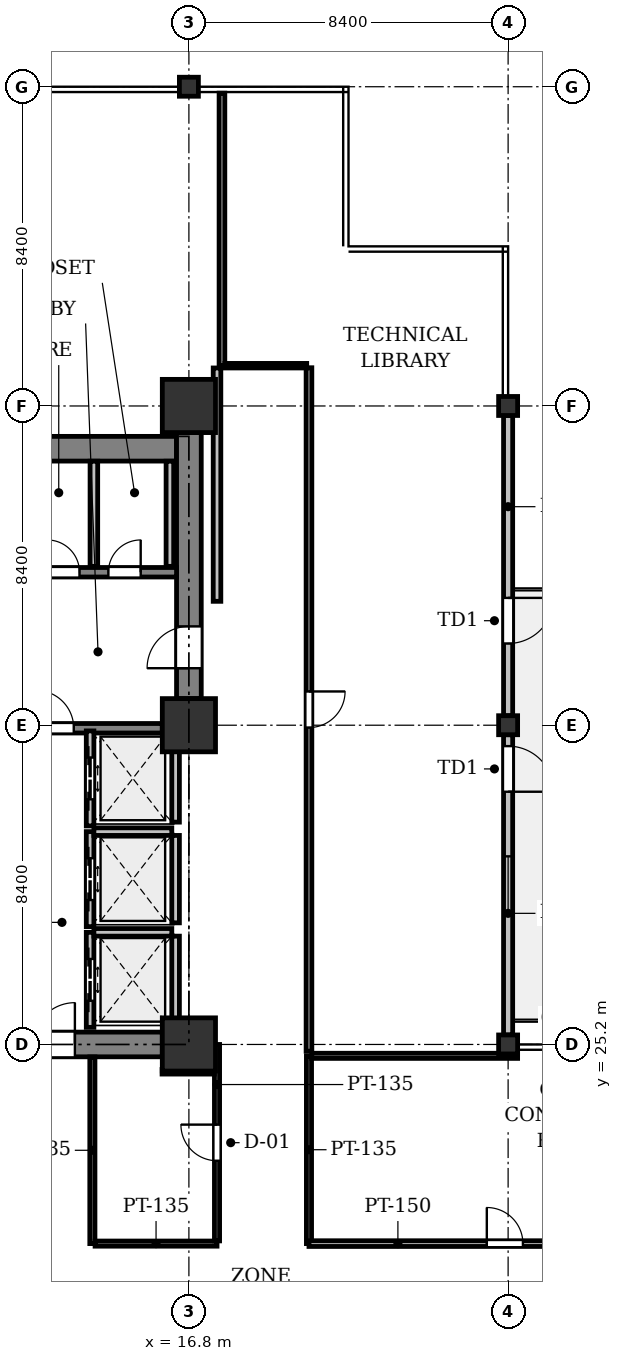
"""IFC4 building model, lengths in metres.
Left out: names, types, materials, properties, quantities, classifications, styles, units other than length and angle.
Written with IfcOpenShell. Run it as: python <this file> out.ifc"""

import sys

from ifc_helpers import new_model, si_unit, direction, frame, frame_2d, origin, origin_2d, place, context, subcontext, project, spatial, rectangle, i_section, extrude, element, fill, save


model = new_model("IFC4")
c1 = context("Model", 3, precision=1e-05, world=origin(), true_north=direction((0.0, 1.0)))
c2 = subcontext(c1, "Body", "Model", "MODEL_VIEW")
j1 = project(units=[si_unit("LENGTHUNIT", "METRE"), si_unit("PLANEANGLEUNIT", "RADIAN")], contexts=[c1])
p1 = place(None, origin())
s1 = spatial("IfcSite", under=j1, at=p1, CompositionType="ELEMENT")
p2 = place(p1, origin())
s2 = spatial("IfcBuilding", under=s1, at=p2, CompositionType="ELEMENT")
p3 = place(p2, frame((0.0, 0.0, 37.4)))
s3 = spatial("IfcBuildingStorey", under=s2, at=p3, CompositionType="ELEMENT", Elevation=37.4)
for number, where, z_axis, x_axis in (
    (1, (16.8, 25.2, 0.0), (0.0, 0.0, 1.0), (1.0, 0.0, 0.0)),
    (2, (16.8, 33.6, 0.0), (0.0, 0.0, 1.0), (1.0, 0.0, 0.0)),
    (3, (16.8, 42.0, 0.0), (0.0, 0.0, 1.0), (1.0, 0.0, 0.0)),
):
    element("IfcColumn", number, at=place(p3, frame(where, z_axis=z_axis, x_axis=x_axis)), inside=s3, PredefinedType="COLUMN", context=c2, shape_type="SweptSolid", body=[
        extrude(rectangle(XDim=1.4, YDim=1.4, at=origin_2d()), origin(), (0.0, 0.0, 1.0), 4.2),
    ])
for number, where, z_axis, x_axis in (
    (4, (16.8, 50.4, 0.0), (0.0, 0.0, 1.0), (1.0, 0.0, 0.0)),
    (5, (25.2, 25.2, 0.0), (0.0, 0.0, 1.0), (1.0, 0.0, 0.0)),
    (6, (25.2, 33.6, 0.0), (0.0, 0.0, 1.0), (1.0, 0.0, 0.0)),
    (7, (25.2, 42.0, 0.0), (0.0, 0.0, 1.0), (1.0, 0.0, 0.0)),
):
    element("IfcColumn", number, at=place(p3, frame(where, z_axis=z_axis, x_axis=x_axis)), inside=s3, PredefinedType="COLUMN", context=c2, shape_type="SweptSolid", body=[
        extrude(i_section(OverallWidth=0.5, OverallDepth=0.5, WebThickness=0.028, FlangeThickness=0.04, at=origin_2d()), origin(), (0.0, 0.0, 1.0), 4.2),
    ])
p4 = place(p3, frame((25.2, 41.75, 0.0), z_axis=(0.0, 0.0, 1.0), x_axis=(0.0, -1.0, 0.0)))
e8 = element("IfcWall", 8, at=p4, inside=s3, PredefinedType="STANDARD", context=c2, shape_type="SweptSolid", body=[
    extrude(rectangle(XDim=7.9, YDim=0.24, at=frame_2d((3.95, 0.0))), origin(), (0.0, 0.0, 1.0), 3.471),
])
p5 = place(p4, frame((4.8, 0.0, 0.0)))
e9 = element("IfcOpeningElement", 9, at=p5, cuts=e8, PredefinedType="OPENING", context=c2, shape_type="SweptSolid", body=[
    extrude(rectangle(XDim=1.2, YDim=2.2, at=frame_2d((0.6, 1.1))), frame((0.0, 0.13, 0.0), z_axis=(0.0, -1.0, 0.0), x_axis=(1.0, 0.0, 0.0)), (0.0, 0.0, 1.0), 0.26),
])
p6 = place(p3, frame((25.2, 33.35, 0.0), z_axis=(0.0, 0.0, 1.0), x_axis=(0.0, -1.0, 0.0)))
e10 = element("IfcWall", 10, at=p6, inside=s3, PredefinedType="STANDARD", context=c2, shape_type="SweptSolid", body=[
    extrude(rectangle(XDim=7.9, YDim=0.24, at=frame_2d((3.95, 0.0))), origin(), (0.0, 0.0, 1.0), 3.471),
])
p7 = place(p6, frame((0.3, 0.0, 0.0)))
e11 = element("IfcOpeningElement", 11, at=p7, cuts=e10, PredefinedType="OPENING", context=c2, shape_type="SweptSolid", body=[
    extrude(rectangle(XDim=1.2, YDim=2.2, at=frame_2d((0.6, 1.1))), frame((0.0, 0.13, 0.0), z_axis=(0.0, -1.0, 0.0), x_axis=(1.0, 0.0, 0.0)), (0.0, 0.0, 1.0), 0.26),
])
p8 = place(p6, frame((3.2, 0.0, 0.9)))
e12 = element("IfcOpeningElement", 12, at=p8, cuts=e10, PredefinedType="OPENING", context=c2, shape_type="SweptSolid", body=[
    extrude(rectangle(XDim=1.5, YDim=1.6, at=frame_2d((0.75, 0.8))), frame((0.0, 0.13, 0.0), z_axis=(0.0, -1.0, 0.0), x_axis=(1.0, 0.0, 0.0)), (0.0, 0.0, 1.0), 0.26),
])
p9 = place(p3, frame((8.725, 40.875, 0.0), z_axis=(0.0, 0.0, 1.0), x_axis=(1.0, 0.0, 0.0)))
e13 = element("IfcWall", 13, at=p9, inside=s3, PredefinedType="SHEAR", context=c2, shape_type="SweptSolid", body=[
    extrude(rectangle(XDim=7.75, YDim=0.65, at=frame_2d((3.875, 0.0))), origin(), (0.0, 0.0, 1.0), 3.925),
])
p10 = place(p3, frame((16.8, 34.3, 0.0), z_axis=(0.0, 0.0, 1.0), x_axis=(0.0, 1.0, 0.0)))
e14 = element("IfcWall", 14, at=p10, inside=s3, PredefinedType="SHEAR", context=c2, shape_type="SweptSolid", body=[
    extrude(rectangle(XDim=7.0, YDim=0.65, at=frame_2d((3.5, 0.0))), origin(), (0.0, 0.0, 1.0), 3.925),
])
p11 = place(p10, frame((0.8, 0.0, 0.0)))
e15 = element("IfcOpeningElement", 15, at=p11, cuts=e14, PredefinedType="OPENING", context=c2, shape_type="SweptSolid", body=[
    extrude(rectangle(XDim=1.1, YDim=2.15, at=frame_2d((0.55, 1.075))), frame((0.0, 0.335, 0.0), z_axis=(0.0, -1.0, 0.0), x_axis=(1.0, 0.0, 0.0)), (0.0, 0.0, 1.0), 0.67),
])
p12 = place(p3, frame((9.1, 25.2, 0.0), z_axis=(0.0, 0.0, 1.0), x_axis=(1.0, 0.0, 0.0)))
e16 = element("IfcWall", 16, at=p12, inside=s3, PredefinedType="SHEAR", context=c2, shape_type="SweptSolid", body=[
    extrude(rectangle(XDim=7.0, YDim=0.65, at=frame_2d((3.5, 0.0))), origin(), (0.0, 0.0, 1.0), 3.925),
])
p13 = place(p12, frame((3.6, 0.0, 0.0)))
e17 = element("IfcOpeningElement", 17, at=p13, cuts=e16, PredefinedType="OPENING", context=c2, shape_type="SweptSolid", body=[
    extrude(rectangle(XDim=1.1, YDim=2.15, at=frame_2d((0.55, 1.075))), frame((0.0, 0.335, 0.0), z_axis=(0.0, -1.0, 0.0), x_axis=(1.0, 0.0, 0.0)), (0.0, 0.0, 1.0), 0.67),
])
p14 = place(p3, frame((12.45, 33.52, 0.0), z_axis=(0.0, 0.0, 1.0), x_axis=(1.0, 0.0, 0.0)))
e18 = element("IfcWall", 18, at=p14, inside=s3, PredefinedType="SHEAR", context=c2, shape_type="SweptSolid", body=[
    extrude(rectangle(XDim=3.65, YDim=0.25, at=frame_2d((1.825, 0.0))), origin(), (0.0, 0.0, 1.0), 3.925),
])
p15 = place(p14, frame((0.32, 0.0, 0.0)))
e19 = element("IfcOpeningElement", 19, at=p15, cuts=e18, PredefinedType="OPENING", context=c2, shape_type="SweptSolid", body=[
    extrude(rectangle(XDim=1.0, YDim=2.15, at=frame_2d((0.5, 1.075))), frame((0.0, 0.135, 0.0), z_axis=(0.0, -1.0, 0.0), x_axis=(1.0, 0.0, 0.0)), (0.0, 0.0, 1.0), 0.27),
])
p16 = place(p3, frame((12.45, 37.625, 0.0), z_axis=(0.0, 0.0, 1.0), x_axis=(1.0, 0.0, 0.0)))
e20 = element("IfcWall", 20, at=p16, inside=s3, PredefinedType="SHEAR", context=c2, shape_type="SweptSolid", body=[
    extrude(rectangle(XDim=4.025, YDim=0.25, at=frame_2d((2.013, 0.0))), origin(), (0.0, 0.0, 1.0), 3.925),
])
p17 = place(p16, frame((0.622, 0.0, 0.0)))
e21 = element("IfcOpeningElement", 21, at=p17, cuts=e20, PredefinedType="OPENING", context=c2, shape_type="SweptSolid", body=[
    extrude(rectangle(XDim=0.85, YDim=2.15, at=frame_2d((0.425, 1.075))), frame((0.0, 0.135, 0.0), z_axis=(0.0, -1.0, 0.0), x_axis=(1.0, 0.0, 0.0)), (0.0, 0.0, 1.0), 0.27),
])
p18 = place(p16, frame((2.231, 0.0, 0.0)))
e22 = element("IfcOpeningElement", 22, at=p18, cuts=e20, PredefinedType="OPENING", context=c2, shape_type="SweptSolid", body=[
    extrude(rectangle(XDim=0.85, YDim=2.15, at=frame_2d((0.425, 1.075))), frame((0.0, 0.135, 0.0), z_axis=(0.0, -1.0, 0.0), x_axis=(1.0, 0.0, 0.0)), (0.0, 0.0, 1.0), 0.27),
])
p19 = place(p3, frame((14.2, 25.65, 0.0), z_axis=(0.0, 0.0, 1.0), x_axis=(0.0, 1.0, 0.0)))
e23 = element("IfcWall", 23, at=p19, inside=s3, PredefinedType="PARTITIONING", context=c2, shape_type="SweptSolid", body=[
    extrude(rectangle(XDim=2.5, YDim=0.2, at=frame_2d((1.25, 0.0))), origin(), (0.0, 0.0, 1.0), 3.925),
])
p20 = place(p19, frame((0.7, 0.0, 0.0)))
e24 = element("IfcOpeningElement", 24, at=p20, cuts=e23, PredefinedType="OPENING", context=c2, shape_type="SweptSolid", body=[
    extrude(rectangle(XDim=1.1, YDim=2.2, at=frame_2d((0.55, 1.1))), frame((0.0, 0.11, 0.0), z_axis=(0.0, -1.0, 0.0), x_axis=(1.0, 0.0, 0.0)), (0.0, 0.0, 1.0), 0.22),
])
p21 = place(p3, frame((16.45, 25.75, 0.0), z_axis=(0.0, 0.0, 1.0), x_axis=(0.0, 1.0, 0.0)))
e25 = element("IfcWall", 25, at=p21, inside=s3, PredefinedType="PARTITIONING", context=c2, shape_type="SweptSolid", body=[
    extrude(rectangle(XDim=2.3, YDim=0.2, at=frame_2d((1.15, 0.0))), origin(), (0.0, 0.0, 1.0), 3.925),
])
p22 = place(p3, frame((14.3, 28.15, 0.0), z_axis=(0.0, 0.0, 1.0), x_axis=(1.0, 0.0, 0.0)))
e26 = element("IfcWall", 26, at=p22, inside=s3, PredefinedType="PARTITIONING", context=c2, shape_type="SweptSolid", body=[
    extrude(rectangle(XDim=2.05, YDim=0.2, at=frame_2d((1.025, 0.0))), origin(), (0.0, 0.0, 1.0), 3.925),
])
p23 = place(p3, frame((14.2, 28.3, 0.0), z_axis=(0.0, 0.0, 1.0), x_axis=(0.0, 1.0, 0.0)))
e27 = element("IfcWall", 27, at=p23, inside=s3, PredefinedType="PARTITIONING", context=c2, shape_type="SweptSolid", body=[
    extrude(rectangle(XDim=2.5, YDim=0.2, at=frame_2d((1.25, 0.0))), origin(), (0.0, 0.0, 1.0), 3.925),
])
p24 = place(p23, frame((0.7, 0.0, 0.0)))
e28 = element("IfcOpeningElement", 28, at=p24, cuts=e27, PredefinedType="OPENING", context=c2, shape_type="SweptSolid", body=[
    extrude(rectangle(XDim=1.1, YDim=2.2, at=frame_2d((0.55, 1.1))), frame((0.0, 0.11, 0.0), z_axis=(0.0, -1.0, 0.0), x_axis=(1.0, 0.0, 0.0)), (0.0, 0.0, 1.0), 0.22),
])
p25 = place(p3, frame((16.45, 28.4, 0.0), z_axis=(0.0, 0.0, 1.0), x_axis=(0.0, 1.0, 0.0)))
e29 = element("IfcWall", 29, at=p25, inside=s3, PredefinedType="PARTITIONING", context=c2, shape_type="SweptSolid", body=[
    extrude(rectangle(XDim=2.3, YDim=0.2, at=frame_2d((1.15, 0.0))), origin(), (0.0, 0.0, 1.0), 3.925),
])
p26 = place(p3, frame((14.3, 30.8, 0.0), z_axis=(0.0, 0.0, 1.0), x_axis=(1.0, 0.0, 0.0)))
e30 = element("IfcWall", 30, at=p26, inside=s3, PredefinedType="PARTITIONING", context=c2, shape_type="SweptSolid", body=[
    extrude(rectangle(XDim=2.05, YDim=0.2, at=frame_2d((1.025, 0.0))), origin(), (0.0, 0.0, 1.0), 3.925),
])
p27 = place(p3, frame((14.2, 30.95, 0.0), z_axis=(0.0, 0.0, 1.0), x_axis=(0.0, 1.0, 0.0)))
e31 = element("IfcWall", 31, at=p27, inside=s3, PredefinedType="PARTITIONING", context=c2, shape_type="SweptSolid", body=[
    extrude(rectangle(XDim=2.5, YDim=0.2, at=frame_2d((1.25, 0.0))), origin(), (0.0, 0.0, 1.0), 3.925),
])
p28 = place(p27, frame((0.7, 0.0, 0.0)))
e32 = element("IfcOpeningElement", 32, at=p28, cuts=e31, PredefinedType="OPENING", context=c2, shape_type="SweptSolid", body=[
    extrude(rectangle(XDim=1.1, YDim=2.2, at=frame_2d((0.55, 1.1))), frame((0.0, 0.11, 0.0), z_axis=(0.0, -1.0, 0.0), x_axis=(1.0, 0.0, 0.0)), (0.0, 0.0, 1.0), 0.22),
])
p29 = place(p3, frame((16.45, 31.05, 0.0), z_axis=(0.0, 0.0, 1.0), x_axis=(0.0, 1.0, 0.0)))
e33 = element("IfcWall", 33, at=p29, inside=s3, PredefinedType="PARTITIONING", context=c2, shape_type="SweptSolid", body=[
    extrude(rectangle(XDim=2.3, YDim=0.2, at=frame_2d((1.15, 0.0))), origin(), (0.0, 0.0, 1.0), 3.925),
])
for number, where, z_axis, x_axis in (
    (34, (14.3, 37.78, 0.0), (0.0, 0.0, 1.0), (0.0, 1.0, 0.0)),
    (35, (16.3, 37.78, 0.0), (0.0, 0.0, 1.0), (0.0, 1.0, 0.0)),
):
    element("IfcWall", number, at=place(p3, frame(where, z_axis=z_axis, x_axis=x_axis)), inside=s3, PredefinedType="PARTITIONING", context=c2, shape_type="SweptSolid", body=[
        extrude(rectangle(XDim=2.766, YDim=0.2, at=frame_2d((1.383, 0.0))), origin(), (0.0, 0.0, 1.0), 2.825),
    ])
p30 = place(p3, frame((14.26, 24.871, 0.0), z_axis=(0.0, 0.0, 1.0), x_axis=(0.0, -1.0, 0.0)))
e36 = element("IfcWall", 36, at=p30, inside=s3, PredefinedType="PARTITIONING", context=c2, shape_type="SweptSolid", body=[
    extrude(rectangle(XDim=4.911, YDim=0.135, at=frame_2d((2.456, 0.0))), origin(), (0.0, 0.0, 1.0), 3.925),
])
p31 = place(p3, frame((14.332, 19.96, 0.0), z_axis=(0.0, 0.0, 1.0), x_axis=(1.0, 0.0, 0.0)))
e37 = element("IfcWall", 37, at=p31, inside=s3, PredefinedType="PARTITIONING", context=c2, shape_type="SweptSolid", body=[
    extrude(rectangle(XDim=3.208, YDim=0.135, at=frame_2d((1.604, 0.0))), origin(), (0.0, 0.0, 1.0), 3.323),
])
p32 = place(p3, frame((17.54, 20.031, 0.0), z_axis=(0.0, 0.0, 1.0), x_axis=(0.0, 1.0, 0.0)))
e38 = element("IfcWall", 38, at=p32, inside=s3, PredefinedType="PARTITIONING", context=c2, shape_type="SweptSolid", body=[
    extrude(rectangle(XDim=5.168, YDim=0.135, at=frame_2d((2.584, 0.0))), origin(), (0.0, 0.0, 1.0), 3.313),
])
p33 = place(p32, frame((2.109, 0.0, 0.0)))
e39 = element("IfcOpeningElement", 39, at=p33, cuts=e38, PredefinedType="OPENING", context=c2, shape_type="SweptSolid", body=[
    extrude(rectangle(XDim=0.95, YDim=2.15, at=frame_2d((0.475, 1.075))), frame((0.0, 0.077, 0.0), z_axis=(0.0, -1.0, 0.0), x_axis=(1.0, 0.0, 0.0)), (0.0, 0.0, 1.0), 0.155),
])
p34 = place(p3, frame((17.469, 24.48, 0.0), z_axis=(0.0, 0.0, 1.0), x_axis=(-0.99999993688, 0.000355302873, 0.0)))
e40 = element("IfcWall", 40, at=p34, inside=s3, PredefinedType="PARTITIONING", context=c2, shape_type="SweptSolid", body=[
    extrude(rectangle(XDim=1.374, YDim=0.12, at=frame_2d((0.687, 0.0))), origin(), (0.0, 0.0, 1.0), 3.323),
])
p35 = place(p3, frame((19.96, 24.901, 0.0), z_axis=(0.0, 0.0, 1.0), x_axis=(0.0, -1.0, 0.0)))
e41 = element("IfcWall", 41, at=p35, inside=s3, PredefinedType="PARTITIONING", context=c2, shape_type="SweptSolid", body=[
    extrude(rectangle(XDim=4.941, YDim=0.135, at=frame_2d((2.47, 0.0))), origin(), (0.0, 0.0, 1.0), 3.925),
])
p36 = place(p3, frame((19.96, 19.96, 0.0), z_axis=(0.0, 0.0, 1.0), x_axis=(1.0, 0.0, 0.0)))
e42 = element("IfcWall", 42, at=p36, inside=s3, PredefinedType="PARTITIONING", context=c2, shape_type="SweptSolid", body=[
    extrude(rectangle(XDim=10.309, YDim=0.15, at=frame_2d((5.154, 0.0))), origin(), (0.0, 0.0, 1.0), 3.323),
])
p37 = place(p36, frame((4.679, 0.0, 0.0)))
e43 = element("IfcOpeningElement", 43, at=p37, cuts=e42, PredefinedType="OPENING", context=c2, shape_type="SweptSolid", body=[
    extrude(rectangle(XDim=0.95, YDim=2.15, at=frame_2d((0.475, 1.075))), frame((0.0, 0.085, 0.0), z_axis=(0.0, -1.0, 0.0), x_axis=(1.0, 0.0, 0.0)), (0.0, 0.0, 1.0), 0.17),
])
p38 = place(p3, frame((25.45, 24.901, 0.0), z_axis=(0.0, 0.0, 1.0), x_axis=(-1.0, 0.0, 0.0)))
e44 = element("IfcWall", 44, at=p38, inside=s3, PredefinedType="PARTITIONING", context=c2, shape_type="SweptSolid", body=[
    extrude(rectangle(XDim=5.418, YDim=0.135, at=frame_2d((2.709, 0.0))), origin(), (0.0, 0.0, 1.0), 3.323),
])
p39 = place(p3, frame((19.96, 43.006, 0.0), z_axis=(0.0, 0.0, 1.0), x_axis=(1.3574599e-05, -0.999999999908, 0.0)))
e45 = element("IfcWall", 45, at=p39, inside=s3, PredefinedType="PARTITIONING", context=c2, shape_type="SweptSolid", body=[
    extrude(rectangle(XDim=17.985, YDim=0.15, at=frame_2d((8.993, 0.0))), origin(), (0.0, 0.0, 1.0), 3.313),
])
p40 = place(p39, frame((8.518, 0.0, 0.0)))
e46 = element("IfcOpeningElement", 46, at=p40, cuts=e45, PredefinedType="OPENING", context=c2, shape_type="SweptSolid", body=[
    extrude(rectangle(XDim=0.95, YDim=2.15, at=frame_2d((0.475, 1.075))), frame((0.0, 0.085, 0.0), z_axis=(0.0, -1.0, 0.0), x_axis=(1.0, 0.0, 0.0)), (0.0, 0.0, 1.0), 0.17),
])
p41 = place(p3, frame((17.67, 50.231, 0.0), z_axis=(0.0, 0.0, 1.0), x_axis=(0.0, -1.0, 0.0)))
e47 = element("IfcWall", 47, at=p41, inside=s3, PredefinedType="PARTITIONING", context=c2, shape_type="SweptSolid", body=[
    extrude(rectangle(XDim=7.171, YDim=0.15, at=frame_2d((3.585, 0.0))), origin(), (0.0, 0.0, 1.0), 3.925),
])
p42 = place(p3, frame((17.749, 43.06, 0.0), z_axis=(0.0, 0.0, 1.0), x_axis=(1.0, 0.0, 0.0)))
e48 = element("IfcWall", 48, at=p42, inside=s3, PredefinedType="PARTITIONING", context=c2, shape_type="SweptSolid", body=[
    extrude(rectangle(XDim=2.151, YDim=0.12, at=frame_2d((1.075, 0.0))), origin(), (0.0, 0.0, 1.0), 3.925),
])
p43 = place(p3, frame((17.54, 36.86, 0.0), z_axis=(0.0, 0.0, 1.0), x_axis=(0.0, 1.0, 0.0)))
e49 = element("IfcWall", 49, at=p43, inside=s3, PredefinedType="PARTITIONING", context=c2, shape_type="SweptSolid", body=[
    extrude(rectangle(XDim=6.14, YDim=0.2, at=frame_2d((3.07, 0.0))), origin(), (0.0, 0.0, 1.0), 3.313),
])
p44 = place(p5, origin())
e50 = element("IfcDoor", 50, at=p44, inside=s3, OperationType="SINGLE_SWING_LEFT", PredefinedType="DOOR", context=c2, shape_type="SweptSolid", body=[
    extrude(rectangle(XDim=1.2, YDim=2.2, at=frame_2d((0.6, 1.1))), frame((0.0, 0.025, 0.0), z_axis=(0.0, -1.0, 0.0), x_axis=(1.0, 0.0, 0.0)), (0.0, 0.0, 1.0), 0.05),
])
fill(e9, e50)
p45 = place(p7, origin())
e51 = element("IfcDoor", 51, at=p45, inside=s3, OperationType="SINGLE_SWING_RIGHT", PredefinedType="DOOR", context=c2, shape_type="SweptSolid", body=[
    extrude(rectangle(XDim=1.2, YDim=2.2, at=frame_2d((0.6, 1.1))), frame((0.0, 0.025, 0.0), z_axis=(0.0, -1.0, 0.0), x_axis=(1.0, 0.0, 0.0)), (0.0, 0.0, 1.0), 0.05),
])
fill(e11, e51)
p46 = place(p8, origin())
e52 = element("IfcWindow", 52, at=p46, inside=s3, PartitioningType="SINGLE_PANEL", PredefinedType="WINDOW", context=c2, shape_type="SweptSolid", body=[
    extrude(rectangle(XDim=1.5, YDim=1.6, at=frame_2d((0.75, 0.8))), frame((0.0, 0.03, 0.0), z_axis=(0.0, -1.0, 0.0), x_axis=(1.0, 0.0, 0.0)), (0.0, 0.0, 1.0), 0.06),
])
fill(e12, e52)
p47 = place(p11, origin())
e53 = element("IfcDoor", 53, at=p47, inside=s3, OperationType="SINGLE_SWING_LEFT", PredefinedType="DOOR", context=c2, shape_type="SweptSolid", body=[
    extrude(rectangle(XDim=1.1, YDim=2.15, at=frame_2d((0.55, 1.075))), frame((0.0, 0.025, 0.0), z_axis=(0.0, -1.0, 0.0), x_axis=(1.0, 0.0, 0.0)), (0.0, 0.0, 1.0), 0.05),
])
fill(e15, e53)
p48 = place(p13, origin())
e54 = element("IfcDoor", 54, at=p48, inside=s3, OperationType="SINGLE_SWING_RIGHT", PredefinedType="DOOR", context=c2, shape_type="SweptSolid", body=[
    extrude(rectangle(XDim=1.1, YDim=2.15, at=frame_2d((0.55, 1.075))), frame((0.0, 0.025, 0.0), z_axis=(0.0, -1.0, 0.0), x_axis=(1.0, 0.0, 0.0)), (0.0, 0.0, 1.0), 0.05),
])
fill(e17, e54)
p49 = place(p15, origin())
e55 = element("IfcDoor", 55, at=p49, inside=s3, OperationType="SINGLE_SWING_LEFT", PredefinedType="DOOR", context=c2, shape_type="SweptSolid", body=[
    extrude(rectangle(XDim=1.0, YDim=2.15, at=frame_2d((0.5, 1.075))), frame((0.0, 0.025, 0.0), z_axis=(0.0, -1.0, 0.0), x_axis=(1.0, 0.0, 0.0)), (0.0, 0.0, 1.0), 0.05),
])
fill(e19, e55)
p50 = place(p20, origin())
e56 = element("IfcDoor", 56, at=p50, inside=s3, OperationType="DOUBLE_DOOR_SLIDING", PredefinedType="DOOR", context=c2, shape_type="SweptSolid", body=[
    extrude(rectangle(XDim=1.1, YDim=2.2, at=frame_2d((0.55, 1.1))), frame((0.0, 0.025, 0.0), z_axis=(0.0, -1.0, 0.0), x_axis=(1.0, 0.0, 0.0)), (0.0, 0.0, 1.0), 0.05),
])
fill(e24, e56)
p51 = place(p24, origin())
e57 = element("IfcDoor", 57, at=p51, inside=s3, OperationType="DOUBLE_DOOR_SLIDING", PredefinedType="DOOR", context=c2, shape_type="SweptSolid", body=[
    extrude(rectangle(XDim=1.1, YDim=2.2, at=frame_2d((0.55, 1.1))), frame((0.0, 0.025, 0.0), z_axis=(0.0, -1.0, 0.0), x_axis=(1.0, 0.0, 0.0)), (0.0, 0.0, 1.0), 0.05),
])
fill(e28, e57)
p52 = place(p28, origin())
e58 = element("IfcDoor", 58, at=p52, inside=s3, OperationType="DOUBLE_DOOR_SLIDING", PredefinedType="DOOR", context=c2, shape_type="SweptSolid", body=[
    extrude(rectangle(XDim=1.1, YDim=2.2, at=frame_2d((0.55, 1.1))), frame((0.0, 0.025, 0.0), z_axis=(0.0, -1.0, 0.0), x_axis=(1.0, 0.0, 0.0)), (0.0, 0.0, 1.0), 0.05),
])
fill(e32, e58)
p53 = place(p17, origin())
e59 = element("IfcDoor", 59, at=p53, inside=s3, OperationType="SINGLE_SWING_LEFT", PredefinedType="DOOR", context=c2, shape_type="SweptSolid", body=[
    extrude(rectangle(XDim=0.85, YDim=2.15, at=frame_2d((0.425, 1.075))), frame((0.0, 0.025, 0.0), z_axis=(0.0, -1.0, 0.0), x_axis=(1.0, 0.0, 0.0)), (0.0, 0.0, 1.0), 0.05),
])
fill(e21, e59)
p54 = place(p18, origin())
e60 = element("IfcDoor", 60, at=p54, inside=s3, OperationType="SINGLE_SWING_RIGHT", PredefinedType="DOOR", context=c2, shape_type="SweptSolid", body=[
    extrude(rectangle(XDim=0.85, YDim=2.15, at=frame_2d((0.425, 1.075))), frame((0.0, 0.025, 0.0), z_axis=(0.0, -1.0, 0.0), x_axis=(1.0, 0.0, 0.0)), (0.0, 0.0, 1.0), 0.05),
])
fill(e22, e60)
p55 = place(p33, origin())
e61 = element("IfcDoor", 61, at=p55, inside=s3, OperationType="SINGLE_SWING_RIGHT", PredefinedType="DOOR", context=c2, shape_type="SweptSolid", body=[
    extrude(rectangle(XDim=0.95, YDim=2.15, at=frame_2d((0.475, 1.075))), frame((0.0, 0.025, 0.0), z_axis=(0.0, -1.0, 0.0), x_axis=(1.0, 0.0, 0.0)), (0.0, 0.0, 1.0), 0.05),
])
fill(e39, e61)
p56 = place(p37, origin())
e62 = element("IfcDoor", 62, at=p56, inside=s3, OperationType="SINGLE_SWING_LEFT", PredefinedType="DOOR", context=c2, shape_type="SweptSolid", body=[
    extrude(rectangle(XDim=0.95, YDim=2.15, at=frame_2d((0.475, 1.075))), frame((0.0, 0.025, 0.0), z_axis=(0.0, -1.0, 0.0), x_axis=(1.0, 0.0, 0.0)), (0.0, 0.0, 1.0), 0.05),
])
fill(e43, e62)
p57 = place(p40, origin())
e63 = element("IfcDoor", 63, at=p57, inside=s3, OperationType="SINGLE_SWING_LEFT", PredefinedType="DOOR", context=c2, shape_type="SweptSolid", body=[
    extrude(rectangle(XDim=0.95, YDim=2.15, at=frame_2d((0.475, 1.075))), frame((0.0, 0.025, 0.0), z_axis=(0.0, -1.0, 0.0), x_axis=(1.0, 0.0, 0.0)), (0.0, 0.0, 1.0), 0.05),
])
fill(e46, e63)
save(model, sys.argv[1])
